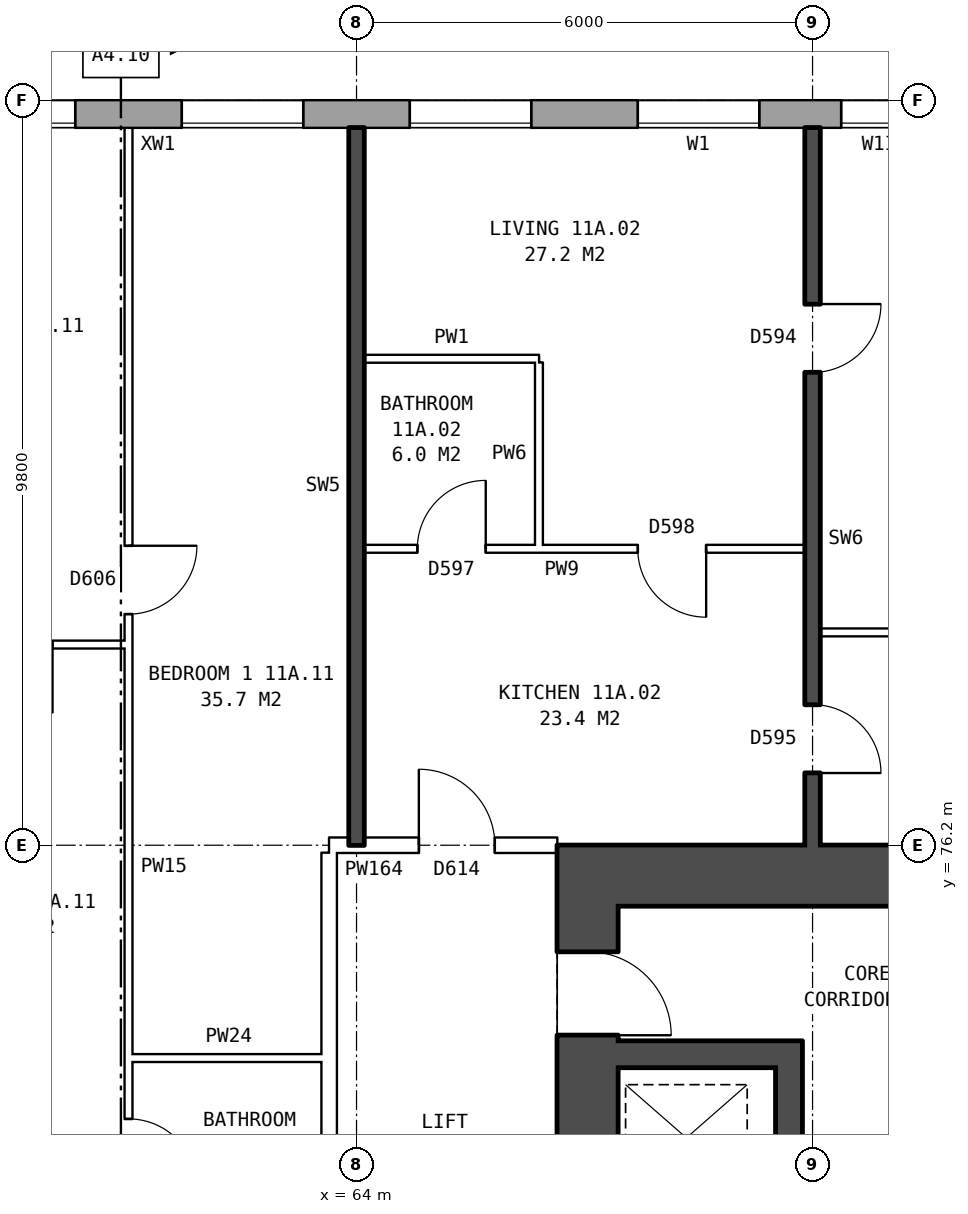
"""IFC4 building model, lengths in metres.
Left out: names, types, materials, properties, quantities, classifications, styles, units other than length and angle.
Written with IfcOpenShell. Run it as: python <this file> out.ifc"""

import sys

from ifc_helpers import new_model, si_unit, direction, frame, frame_2d, origin, place, context, subcontext, project, spatial, rectangle, extrude, element, fill, save


model = new_model("IFC4")
c1 = context("Model", 3, precision=1e-05, world=origin(), true_north=direction((0.0, 1.0)))
c2 = subcontext(c1, "Body", "Model", "MODEL_VIEW")
j1 = project(units=[si_unit("LENGTHUNIT", "METRE"), si_unit("PLANEANGLEUNIT", "RADIAN")], contexts=[c1])
p1 = place(None, origin())
s1 = spatial("IfcSite", under=j1, at=p1, CompositionType="ELEMENT")
p2 = place(p1, origin())
s2 = spatial("IfcBuilding", under=s1, at=p2, CompositionType="ELEMENT")
p3 = place(p2, frame((0.0, 0.0, 44.3)))
s3 = spatial("IfcBuildingStorey", under=s2, at=p3, CompositionType="ELEMENT", Elevation=44.3)
p4 = place(p3, frame((72.925, 85.82, 0.0), z_axis=(0.0, 0.0, 1.0), x_axis=(-1.0, 0.0, 0.0)))
e1 = element("IfcWall", 1, at=p4, inside=s3, PredefinedType="STANDARD", context=c2, shape_type="SweptSolid", body=[
    extrude(rectangle(XDim=48.351, YDim=0.36, at=frame_2d((24.175, 0.0))), origin(), (0.0, 0.0, 1.0), 2.85),
])
p5 = place(p4, frame((0.65, 0.0, 0.8)))
e2 = element("IfcOpeningElement", 2, at=p5, cuts=e1, PredefinedType="OPENING", context=c2, shape_type="SweptSolid", body=[
    extrude(rectangle(XDim=0.6, YDim=0.9, at=frame_2d((0.3, 0.45))), frame((0.0, 0.19, 0.0), z_axis=(0.0, -1.0, 0.0), x_axis=(1.0, 0.0, 0.0)), (0.0, 0.0, 1.0), 0.38),
])
p6 = place(p4, frame((3.625, 0.0, 0.8)))
e3 = element("IfcOpeningElement", 3, at=p6, cuts=e1, PredefinedType="OPENING", context=c2, shape_type="SweptSolid", body=[
    extrude(rectangle(XDim=1.6, YDim=1.8, at=frame_2d((0.8, 0.9))), frame((0.0, 0.19, 0.0), z_axis=(0.0, -1.0, 0.0), x_axis=(1.0, 0.0, 0.0)), (0.0, 0.0, 1.0), 0.38),
])
p7 = place(p4, frame((6.625, 0.0, 0.8)))
e4 = element("IfcOpeningElement", 4, at=p7, cuts=e1, PredefinedType="OPENING", context=c2, shape_type="SweptSolid", body=[
    extrude(rectangle(XDim=1.6, YDim=1.8, at=frame_2d((0.8, 0.9))), frame((0.0, 0.19, 0.0), z_axis=(0.0, -1.0, 0.0), x_axis=(1.0, 0.0, 0.0)), (0.0, 0.0, 1.0), 0.38),
])
p8 = place(p4, frame((9.625, 0.0, 0.8)))
e5 = element("IfcOpeningElement", 5, at=p8, cuts=e1, PredefinedType="OPENING", context=c2, shape_type="SweptSolid", body=[
    extrude(rectangle(XDim=1.6, YDim=1.8, at=frame_2d((0.8, 0.9))), frame((0.0, 0.19, 0.0), z_axis=(0.0, -1.0, 0.0), x_axis=(1.0, 0.0, 0.0)), (0.0, 0.0, 1.0), 0.38),
])
p9 = place(p4, frame((12.625, 0.0, 0.8)))
e6 = element("IfcOpeningElement", 6, at=p9, cuts=e1, PredefinedType="OPENING", context=c2, shape_type="SweptSolid", body=[
    extrude(rectangle(XDim=1.6, YDim=1.8, at=frame_2d((0.8, 0.9))), frame((0.0, 0.19, 0.0), z_axis=(0.0, -1.0, 0.0), x_axis=(1.0, 0.0, 0.0)), (0.0, 0.0, 1.0), 0.38),
])
p10 = place(p4, frame((15.625, 0.0, 0.8)))
e7 = element("IfcOpeningElement", 7, at=p10, cuts=e1, PredefinedType="OPENING", context=c2, shape_type="SweptSolid", body=[
    extrude(rectangle(XDim=1.6, YDim=1.8, at=frame_2d((0.8, 0.9))), frame((0.0, 0.19, 0.0), z_axis=(0.0, -1.0, 0.0), x_axis=(1.0, 0.0, 0.0)), (0.0, 0.0, 1.0), 0.38),
])
p11 = place(p4, frame((18.625, 0.0, 0.8)))
e8 = element("IfcOpeningElement", 8, at=p11, cuts=e1, PredefinedType="OPENING", context=c2, shape_type="SweptSolid", body=[
    extrude(rectangle(XDim=1.6, YDim=1.8, at=frame_2d((0.8, 0.9))), frame((0.0, 0.19, 0.0), z_axis=(0.0, -1.0, 0.0), x_axis=(1.0, 0.0, 0.0)), (0.0, 0.0, 1.0), 0.38),
])
p12 = place(p4, frame((21.625, 0.0, 0.8)))
e9 = element("IfcOpeningElement", 9, at=p12, cuts=e1, PredefinedType="OPENING", context=c2, shape_type="SweptSolid", body=[
    extrude(rectangle(XDim=1.6, YDim=1.8, at=frame_2d((0.8, 0.9))), frame((0.0, 0.19, 0.0), z_axis=(0.0, -1.0, 0.0), x_axis=(1.0, 0.0, 0.0)), (0.0, 0.0, 1.0), 0.38),
])
p13 = place(p4, frame((24.625, 0.0, 0.8)))
e10 = element("IfcOpeningElement", 10, at=p13, cuts=e1, PredefinedType="OPENING", context=c2, shape_type="SweptSolid", body=[
    extrude(rectangle(XDim=1.6, YDim=1.8, at=frame_2d((0.8, 0.9))), frame((0.0, 0.19, 0.0), z_axis=(0.0, -1.0, 0.0), x_axis=(1.0, 0.0, 0.0)), (0.0, 0.0, 1.0), 0.38),
])
p14 = place(p4, frame((27.625, 0.0, 0.8)))
e11 = element("IfcOpeningElement", 11, at=p14, cuts=e1, PredefinedType="OPENING", context=c2, shape_type="SweptSolid", body=[
    extrude(rectangle(XDim=1.6, YDim=1.8, at=frame_2d((0.8, 0.9))), frame((0.0, 0.19, 0.0), z_axis=(0.0, -1.0, 0.0), x_axis=(1.0, 0.0, 0.0)), (0.0, 0.0, 1.0), 0.38),
])
p15 = place(p4, frame((30.625, 0.0, 0.8)))
e12 = element("IfcOpeningElement", 12, at=p15, cuts=e1, PredefinedType="OPENING", context=c2, shape_type="SweptSolid", body=[
    extrude(rectangle(XDim=1.6, YDim=1.8, at=frame_2d((0.8, 0.9))), frame((0.0, 0.19, 0.0), z_axis=(0.0, -1.0, 0.0), x_axis=(1.0, 0.0, 0.0)), (0.0, 0.0, 1.0), 0.38),
])
p16 = place(p4, frame((33.625, 0.0, 0.8)))
e13 = element("IfcOpeningElement", 13, at=p16, cuts=e1, PredefinedType="OPENING", context=c2, shape_type="SweptSolid", body=[
    extrude(rectangle(XDim=1.6, YDim=1.8, at=frame_2d((0.8, 0.9))), frame((0.0, 0.19, 0.0), z_axis=(0.0, -1.0, 0.0), x_axis=(1.0, 0.0, 0.0)), (0.0, 0.0, 1.0), 0.38),
])
p17 = place(p4, frame((36.625, 0.0, 0.8)))
e14 = element("IfcOpeningElement", 14, at=p17, cuts=e1, PredefinedType="OPENING", context=c2, shape_type="SweptSolid", body=[
    extrude(rectangle(XDim=1.6, YDim=1.8, at=frame_2d((0.8, 0.9))), frame((0.0, 0.19, 0.0), z_axis=(0.0, -1.0, 0.0), x_axis=(1.0, 0.0, 0.0)), (0.0, 0.0, 1.0), 0.38),
])
p18 = place(p4, frame((39.625, 0.0, 0.8)))
e15 = element("IfcOpeningElement", 15, at=p18, cuts=e1, PredefinedType="OPENING", context=c2, shape_type="SweptSolid", body=[
    extrude(rectangle(XDim=1.6, YDim=1.8, at=frame_2d((0.8, 0.9))), frame((0.0, 0.19, 0.0), z_axis=(0.0, -1.0, 0.0), x_axis=(1.0, 0.0, 0.0)), (0.0, 0.0, 1.0), 0.38),
])
p19 = place(p4, frame((42.625, 0.0, 0.8)))
e16 = element("IfcOpeningElement", 16, at=p19, cuts=e1, PredefinedType="OPENING", context=c2, shape_type="SweptSolid", body=[
    extrude(rectangle(XDim=1.6, YDim=1.8, at=frame_2d((0.8, 0.9))), frame((0.0, 0.19, 0.0), z_axis=(0.0, -1.0, 0.0), x_axis=(1.0, 0.0, 0.0)), (0.0, 0.0, 1.0), 0.38),
])
p20 = place(p4, frame((45.125, 0.0, 0.8)))
e17 = element("IfcOpeningElement", 17, at=p20, cuts=e1, PredefinedType="OPENING", context=c2, shape_type="SweptSolid", body=[
    extrude(rectangle(XDim=1.2, YDim=1.8, at=frame_2d((0.6, 0.9))), frame((0.0, 0.19, 0.0), z_axis=(0.0, -1.0, 0.0), x_axis=(1.0, 0.0, 0.0)), (0.0, 0.0, 1.0), 0.38),
])
p21 = place(p4, frame((1.55, 0.0, 0.8)))
e18 = element("IfcOpeningElement", 18, at=p21, cuts=e1, PredefinedType="OPENING", context=c2, shape_type="SweptSolid", body=[
    extrude(rectangle(XDim=1.0, YDim=1.5, at=frame_2d((0.5, 0.75))), frame((0.0, 0.19, 0.0), z_axis=(0.0, -1.0, 0.0), x_axis=(1.0, 0.0, 0.0)), (0.0, 0.0, 1.0), 0.38),
])
p22 = place(p4, frame((46.625, 0.0, 0.8)))
e19 = element("IfcOpeningElement", 19, at=p22, cuts=e1, PredefinedType="OPENING", context=c2, shape_type="SweptSolid", body=[
    extrude(rectangle(XDim=1.0, YDim=0.9, at=frame_2d((0.5, 0.45))), frame((0.0, 0.19, 0.0), z_axis=(0.0, -1.0, 0.0), x_axis=(1.0, 0.0, 0.0)), (0.0, 0.0, 1.0), 0.38),
])
p23 = place(p3, frame((67.04, 64.6, 0.0), z_axis=(0.0, 0.0, 1.0), x_axis=(0.0, 1.0, 0.0)))
e20 = element("IfcWall", 20, at=p23, inside=s3, PredefinedType="SHEAR", context=c2, shape_type="SweptSolid", body=[
    extrude(rectangle(XDim=10.8, YDim=0.8, at=frame_2d((5.4, 0.0))), origin(), (0.0, 0.0, 1.0), 2.85),
])
p24 = place(p23, frame((0.525, 0.0, 0.0)))
e21 = element("IfcOpeningElement", 21, at=p24, cuts=e20, PredefinedType="OPENING", context=c2, shape_type="SweptSolid", body=[
    extrude(rectangle(XDim=1.1, YDim=2.1, at=frame_2d((0.55, 1.05))), frame((0.0, 0.41, 0.0), z_axis=(0.0, -1.0, 0.0), x_axis=(1.0, 0.0, 0.0)), (0.0, 0.0, 1.0), 0.82),
])
p25 = place(p23, frame((9.1, 0.0, 0.0)))
e22 = element("IfcOpeningElement", 22, at=p25, cuts=e20, PredefinedType="OPENING", context=c2, shape_type="SweptSolid", body=[
    extrude(rectangle(XDim=1.1, YDim=2.1, at=frame_2d((0.55, 1.05))), frame((0.0, 0.41, 0.0), z_axis=(0.0, -1.0, 0.0), x_axis=(1.0, 0.0, 0.0)), (0.0, 0.0, 1.0), 0.82),
])
p26 = place(p3, frame((66.64, 75.8, 0.0), z_axis=(0.0, 0.0, 1.0), x_axis=(1.0, 0.0, 0.0)))
e23 = element("IfcWall", 23, at=p26, inside=s3, PredefinedType="SHEAR", context=c2, shape_type="SweptSolid", body=[
    extrude(rectangle(XDim=9.0, YDim=0.8, at=frame_2d((4.5, 0.0))), origin(), (0.0, 0.0, 1.0), 2.85),
])
p27 = place(p3, frame((67.44, 73.45, 0.0), z_axis=(0.0, 0.0, 1.0), x_axis=(1.0, 0.0, 0.0)))
e24 = element("IfcWall", 24, at=p27, inside=s3, PredefinedType="SHEAR", context=c2, shape_type="SweptSolid", body=[
    extrude(rectangle(XDim=2.075, YDim=0.35, at=frame_2d((1.038, 0.0))), origin(), (0.0, 0.0, 1.0), 2.85),
])
p28 = place(p3, frame((69.69, 67.025, 0.0), z_axis=(0.0, 0.0, 1.0), x_axis=(0.0, 1.0, 0.0)))
e25 = element("IfcWall", 25, at=p28, inside=s3, PredefinedType="SHEAR", context=c2, shape_type="SweptSolid", body=[
    extrude(rectangle(XDim=6.6, YDim=0.35, at=frame_2d((3.3, 0.0))), origin(), (0.0, 0.0, 1.0), 2.85),
])
p29 = place(p3, frame((63.64, 63.9, 0.0), z_axis=(0.0, 0.0, 1.0), x_axis=(0.0, 1.0, 0.0)))
e26 = element("IfcWall", 26, at=p29, inside=s3, PredefinedType="PARTITIONING", context=c2, shape_type="SweptSolid", body=[
    extrude(rectangle(XDim=12.2, YDim=0.2, at=frame_2d((6.1, 0.0))), origin(), (0.0, 0.0, 1.0), 2.85),
])
p30 = place(p29, frame((5.1, 0.0, 0.0)))
e27 = element("IfcOpeningElement", 27, at=p30, cuts=e26, PredefinedType="OPENING", context=c2, shape_type="SweptSolid", body=[
    extrude(rectangle(XDim=2.0, YDim=2.1, at=frame_2d((1.0, 1.05))), frame((0.0, 0.11, 0.0), z_axis=(0.0, -1.0, 0.0), x_axis=(1.0, 0.0, 0.0)), (0.0, 0.0, 1.0), 0.22),
])
p31 = place(p3, frame((61.0, 73.4, 0.0), z_axis=(0.0, 0.0, 1.0), x_axis=(1.0, 0.0, 0.0)))
e28 = element("IfcWall", 28, at=p31, inside=s3, PredefinedType="PARTITIONING", context=c2, shape_type="SweptSolid", body=[
    extrude(rectangle(XDim=2.64, YDim=0.1, at=frame_2d((1.32, 0.0))), origin(), (0.0, 0.0, 1.0), 2.85),
])
p32 = place(p3, frame((63.64, 76.2, 0.0), z_axis=(0.0, 0.0, 1.0), x_axis=(1.0, 0.0, 0.0)))
e29 = element("IfcWall", 29, at=p32, inside=s3, PredefinedType="PARTITIONING", context=c2, shape_type="SweptSolid", body=[
    extrude(rectangle(XDim=3.0, YDim=0.2, at=frame_2d((1.5, 0.0))), origin(), (0.0, 0.0, 1.0), 2.85),
])
p33 = place(p32, frame((1.18, 0.0, 0.0)))
e30 = element("IfcOpeningElement", 30, at=p33, cuts=e29, PredefinedType="OPENING", context=c2, shape_type="SweptSolid", body=[
    extrude(rectangle(XDim=1.0, YDim=2.1, at=frame_2d((0.5, 1.05))), frame((0.0, 0.11, 0.0), z_axis=(0.0, -1.0, 0.0), x_axis=(1.0, 0.0, 0.0)), (0.0, 0.0, 1.0), 0.22),
])
p34 = place(p3, frame((58.1, 78.84, 0.0), z_axis=(0.0, 0.0, 1.0), x_axis=(1.0, 0.0, 0.0)))
e31 = element("IfcWall", 31, at=p34, inside=s3, PredefinedType="PARTITIONING", context=c2, shape_type="SweptSolid", body=[
    extrude(rectangle(XDim=2.9, YDim=0.1, at=frame_2d((1.45, 0.0))), origin(), (0.0, 0.0, 1.0), 2.85),
])
p35 = place(p34, frame((1.0, 0.0, 0.0)))
e32 = element("IfcOpeningElement", 32, at=p35, cuts=e31, PredefinedType="OPENING", context=c2, shape_type="SweptSolid", body=[
    extrude(rectangle(XDim=0.9, YDim=2.1, at=frame_2d((0.45, 1.05))), frame((0.0, 0.06, 0.0), z_axis=(0.0, -1.0, 0.0), x_axis=(1.0, 0.0, 0.0)), (0.0, 0.0, 1.0), 0.12),
])
p36 = place(p3, frame((70.1, 79.0, 0.0), z_axis=(0.0, 0.0, 1.0), x_axis=(1.0, 0.0, 0.0)))
e33 = element("IfcWall", 33, at=p36, inside=s3, PredefinedType="PARTITIONING", context=c2, shape_type="SweptSolid", body=[
    extrude(rectangle(XDim=5.54, YDim=0.1, at=frame_2d((2.77, 0.0))), origin(), (0.0, 0.0, 1.0), 2.85),
])
p37 = place(p3, frame((64.1, 80.1, 0.0), z_axis=(0.0, 0.0, 1.0), x_axis=(1.0, 0.0, 0.0)))
e34 = element("IfcWall", 34, at=p37, inside=s3, PredefinedType="PARTITIONING", context=c2, shape_type="SweptSolid", body=[
    extrude(rectangle(XDim=5.8, YDim=0.1, at=frame_2d((2.9, 0.0))), origin(), (0.0, 0.0, 1.0), 2.85),
])
p38 = place(p37, frame((3.6, 0.0, 0.0)))
e35 = element("IfcOpeningElement", 35, at=p38, cuts=e34, PredefinedType="OPENING", context=c2, shape_type="SweptSolid", body=[
    extrude(rectangle(XDim=0.9, YDim=2.1, at=frame_2d((0.45, 1.05))), frame((0.0, 0.06, 0.0), z_axis=(0.0, -1.0, 0.0), x_axis=(1.0, 0.0, 0.0)), (0.0, 0.0, 1.0), 0.12),
])
p39 = place(p37, frame((0.7, 0.0, 0.0)))
e36 = element("IfcOpeningElement", 36, at=p39, cuts=e34, PredefinedType="OPENING", context=c2, shape_type="SweptSolid", body=[
    extrude(rectangle(XDim=0.9, YDim=2.1, at=frame_2d((0.45, 1.05))), frame((0.0, 0.06, 0.0), z_axis=(0.0, -1.0, 0.0), x_axis=(1.0, 0.0, 0.0)), (0.0, 0.0, 1.0), 0.12),
])
p40 = place(p3, frame((64.1, 82.6, 0.0), z_axis=(0.0, 0.0, 1.0), x_axis=(1.0, 0.0, 0.0)))
e37 = element("IfcWall", 37, at=p40, inside=s3, PredefinedType="PARTITIONING", context=c2, shape_type="SweptSolid", body=[
    extrude(rectangle(XDim=2.3, YDim=0.1, at=frame_2d((1.15, 0.0))), origin(), (0.0, 0.0, 1.0), 2.85),
])
p41 = place(p3, frame((61.0, 71.3, 0.0), z_axis=(0.0, 0.0, 1.0), x_axis=(0.0, 1.0, 0.0)))
e38 = element("IfcWall", 38, at=p41, inside=s3, PredefinedType="PARTITIONING", context=c2, shape_type="SweptSolid", body=[
    extrude(rectangle(XDim=14.34, YDim=0.1, at=frame_2d((7.17, 0.0))), origin(), (0.0, 0.0, 1.0), 2.85),
])
p42 = place(p41, frame((7.94, 0.0, 0.0)))
e39 = element("IfcOpeningElement", 39, at=p42, cuts=e38, PredefinedType="OPENING", context=c2, shape_type="SweptSolid", body=[
    extrude(rectangle(XDim=0.9, YDim=2.1, at=frame_2d((0.45, 1.05))), frame((0.0, 0.06, 0.0), z_axis=(0.0, -1.0, 0.0), x_axis=(1.0, 0.0, 0.0)), (0.0, 0.0, 1.0), 0.12),
])
p43 = place(p41, frame((0.4, 0.0, 0.0)))
e40 = element("IfcOpeningElement", 40, at=p43, cuts=e38, PredefinedType="OPENING", context=c2, shape_type="SweptSolid", body=[
    extrude(rectangle(XDim=0.9, YDim=2.1, at=frame_2d((0.45, 1.05))), frame((0.0, 0.06, 0.0), z_axis=(0.0, -1.0, 0.0), x_axis=(1.0, 0.0, 0.0)), (0.0, 0.0, 1.0), 0.12),
])
p44 = place(p3, frame((64.0, 76.2, 0.0), z_axis=(0.0, 0.0, 1.0), x_axis=(0.0, 1.0, 0.0)))
e41 = element("IfcWall", 41, at=p44, inside=s3, PredefinedType="SOLIDWALL", context=c2, shape_type="SweptSolid", body=[
    extrude(rectangle(XDim=9.44, YDim=0.2, at=frame_2d((4.72, 0.0))), origin(), (0.0, 0.0, 1.0), 2.85),
])
p45 = place(p3, frame((66.4, 80.15, 0.0), z_axis=(0.0, 0.0, 1.0), x_axis=(0.0, 1.0, 0.0)))
e42 = element("IfcWall", 42, at=p45, inside=s3, PredefinedType="PARTITIONING", context=c2, shape_type="SweptSolid", body=[
    extrude(rectangle(XDim=2.4, YDim=0.1, at=frame_2d((1.2, 0.0))), origin(), (0.0, 0.0, 1.0), 2.85),
])
p46 = place(p3, frame((70.0, 76.2, 0.0), z_axis=(0.0, 0.0, 1.0), x_axis=(0.0, 1.0, 0.0)))
e43 = element("IfcWall", 43, at=p46, inside=s3, PredefinedType="SOLIDWALL", context=c2, shape_type="SweptSolid", body=[
    extrude(rectangle(XDim=9.44, YDim=0.2, at=frame_2d((4.72, 0.0))), origin(), (0.0, 0.0, 1.0), 2.85),
])
p47 = place(p46, frame((6.22, 0.0, 0.0)))
e44 = element("IfcOpeningElement", 44, at=p47, cuts=e43, PredefinedType="OPENING", context=c2, shape_type="SweptSolid", body=[
    extrude(rectangle(XDim=0.9, YDim=2.1, at=frame_2d((0.45, 1.05))), frame((0.0, 0.11, 0.0), z_axis=(0.0, -1.0, 0.0), x_axis=(1.0, 0.0, 0.0)), (0.0, 0.0, 1.0), 0.22),
])
p48 = place(p46, frame((0.95, 0.0, 0.0)))
e45 = element("IfcOpeningElement", 45, at=p48, cuts=e43, PredefinedType="OPENING", context=c2, shape_type="SweptSolid", body=[
    extrude(rectangle(XDim=0.9, YDim=2.1, at=frame_2d((0.45, 1.05))), frame((0.0, 0.11, 0.0), z_axis=(0.0, -1.0, 0.0), x_axis=(1.0, 0.0, 0.0)), (0.0, 0.0, 1.0), 0.22),
])
p49 = place(p6, origin())
e46 = element("IfcWindow", 46, at=p49, inside=s3, PartitioningType="SINGLE_PANEL", PredefinedType="WINDOW", context=c2, shape_type="SweptSolid", body=[
    extrude(rectangle(XDim=1.6, YDim=1.8, at=frame_2d((0.8, 0.9))), frame((0.0, 0.15, 0.0), z_axis=(0.0, -1.0, 0.0), x_axis=(1.0, 0.0, 0.0)), (0.0, 0.0, 1.0), 0.06),
])
fill(e3, e46)
p50 = place(p7, origin())
e47 = element("IfcWindow", 47, at=p50, inside=s3, PartitioningType="SINGLE_PANEL", PredefinedType="WINDOW", context=c2, shape_type="SweptSolid", body=[
    extrude(rectangle(XDim=1.6, YDim=1.8, at=frame_2d((0.8, 0.9))), frame((0.0, 0.15, 0.0), z_axis=(0.0, -1.0, 0.0), x_axis=(1.0, 0.0, 0.0)), (0.0, 0.0, 1.0), 0.06),
])
fill(e4, e47)
p51 = place(p8, origin())
e48 = element("IfcWindow", 48, at=p51, inside=s3, PartitioningType="SINGLE_PANEL", PredefinedType="WINDOW", context=c2, shape_type="SweptSolid", body=[
    extrude(rectangle(XDim=1.6, YDim=1.8, at=frame_2d((0.8, 0.9))), frame((0.0, 0.15, 0.0), z_axis=(0.0, -1.0, 0.0), x_axis=(1.0, 0.0, 0.0)), (0.0, 0.0, 1.0), 0.06),
])
fill(e5, e48)
p52 = place(p9, origin())
e49 = element("IfcWindow", 49, at=p52, inside=s3, PartitioningType="SINGLE_PANEL", PredefinedType="WINDOW", context=c2, shape_type="SweptSolid", body=[
    extrude(rectangle(XDim=1.6, YDim=1.8, at=frame_2d((0.8, 0.9))), frame((0.0, 0.15, 0.0), z_axis=(0.0, -1.0, 0.0), x_axis=(1.0, 0.0, 0.0)), (0.0, 0.0, 1.0), 0.06),
])
fill(e6, e49)
p53 = place(p25, frame((1.1, 0.0, 0.0), z_axis=(0.0, 0.0, 1.0), x_axis=(-1.0, 0.0, 0.0)))
e50 = element("IfcDoor", 50, at=p53, inside=s3, OperationType="SINGLE_SWING_RIGHT", PredefinedType="DOOR", context=c2, shape_type="SweptSolid", body=[
    extrude(rectangle(XDim=1.1, YDim=2.1, at=frame_2d((0.55, 1.05))), frame((0.0, 0.385, 0.0), z_axis=(0.0, -1.0, 0.0), x_axis=(1.0, 0.0, 0.0)), (0.0, 0.0, 1.0), 0.05),
])
fill(e22, e50)
p54 = place(p47, frame((0.9, 0.0, 0.0), z_axis=(0.0, 0.0, 1.0), x_axis=(-1.0, 0.0, 0.0)))
e51 = element("IfcDoor", 51, at=p54, inside=s3, OperationType="SINGLE_SWING_LEFT", PredefinedType="DOOR", context=c2, shape_type="SweptSolid", body=[
    extrude(rectangle(XDim=0.9, YDim=2.1, at=frame_2d((0.45, 1.05))), frame((0.0, 0.025, 0.0), z_axis=(0.0, -1.0, 0.0), x_axis=(1.0, 0.0, 0.0)), (0.0, 0.0, 1.0), 0.05),
])
fill(e44, e51)
p55 = place(p48, frame((0.9, 0.0, 0.0), z_axis=(0.0, 0.0, 1.0), x_axis=(-1.0, 0.0, 0.0)))
e52 = element("IfcDoor", 52, at=p55, inside=s3, OperationType="SINGLE_SWING_RIGHT", PredefinedType="DOOR", context=c2, shape_type="SweptSolid", body=[
    extrude(rectangle(XDim=0.9, YDim=2.1, at=frame_2d((0.45, 1.05))), frame((0.0, 0.025, 0.0), z_axis=(0.0, -1.0, 0.0), x_axis=(1.0, 0.0, 0.0)), (0.0, 0.0, 1.0), 0.05),
])
fill(e45, e52)
p56 = place(p33, origin())
e53 = element("IfcDoor", 53, at=p56, inside=s3, OperationType="SINGLE_SWING_LEFT", PredefinedType="DOOR", context=c2, shape_type="SweptSolid", body=[
    extrude(rectangle(XDim=1.0, YDim=2.1, at=frame_2d((0.5, 1.05))), frame((0.0, 0.025, 0.0), z_axis=(0.0, -1.0, 0.0), x_axis=(1.0, 0.0, 0.0)), (0.0, 0.0, 1.0), 0.05),
])
fill(e30, e53)
p57 = place(p38, frame((0.9, 0.0, 0.0), z_axis=(0.0, 0.0, 1.0), x_axis=(-1.0, 0.0, 0.0)))
e54 = element("IfcDoor", 54, at=p57, inside=s3, OperationType="SINGLE_SWING_LEFT", PredefinedType="DOOR", context=c2, shape_type="SweptSolid", body=[
    extrude(rectangle(XDim=0.9, YDim=2.1, at=frame_2d((0.45, 1.05))), frame((0.0, 0.025, 0.0), z_axis=(0.0, -1.0, 0.0), x_axis=(1.0, 0.0, 0.0)), (0.0, 0.0, 1.0), 0.05),
])
fill(e35, e54)
p58 = place(p39, origin())
e55 = element("IfcDoor", 55, at=p58, inside=s3, OperationType="SINGLE_SWING_RIGHT", PredefinedType="DOOR", context=c2, shape_type="SweptSolid", body=[
    extrude(rectangle(XDim=0.9, YDim=2.1, at=frame_2d((0.45, 1.05))), frame((0.0, 0.025, 0.0), z_axis=(0.0, -1.0, 0.0), x_axis=(1.0, 0.0, 0.0)), (0.0, 0.0, 1.0), 0.05),
])
fill(e36, e55)
p59 = place(p42, frame((0.9, 0.0, 0.0), z_axis=(0.0, 0.0, 1.0), x_axis=(-1.0, 0.0, 0.0)))
e56 = element("IfcDoor", 56, at=p59, inside=s3, OperationType="SINGLE_SWING_LEFT", PredefinedType="DOOR", context=c2, shape_type="SweptSolid", body=[
    extrude(rectangle(XDim=0.9, YDim=2.1, at=frame_2d((0.45, 1.05))), frame((0.0, 0.025, 0.0), z_axis=(0.0, -1.0, 0.0), x_axis=(1.0, 0.0, 0.0)), (0.0, 0.0, 1.0), 0.05),
])
fill(e39, e56)
p60 = place(p43, frame((0.9, 0.0, 0.0), z_axis=(0.0, 0.0, 1.0), x_axis=(-1.0, 0.0, 0.0)))
e57 = element("IfcDoor", 57, at=p60, inside=s3, OperationType="SINGLE_SWING_RIGHT", PredefinedType="DOOR", context=c2, shape_type="SweptSolid", body=[
    extrude(rectangle(XDim=0.9, YDim=2.1, at=frame_2d((0.45, 1.05))), frame((0.0, 0.025, 0.0), z_axis=(0.0, -1.0, 0.0), x_axis=(1.0, 0.0, 0.0)), (0.0, 0.0, 1.0), 0.05),
])
fill(e40, e57)
p61 = place(p21, origin())
e58 = element("IfcWindow", 58, at=p61, inside=s3, PartitioningType="SINGLE_PANEL", PredefinedType="WINDOW", context=c2, shape_type="SweptSolid", body=[
    extrude(rectangle(XDim=1.0, YDim=1.5, at=frame_2d((0.5, 0.75))), frame((0.0, 0.15, 0.0), z_axis=(0.0, -1.0, 0.0), x_axis=(1.0, 0.0, 0.0)), (0.0, 0.0, 1.0), 0.06),
])
fill(e18, e58)
save(model, sys.argv[1])
